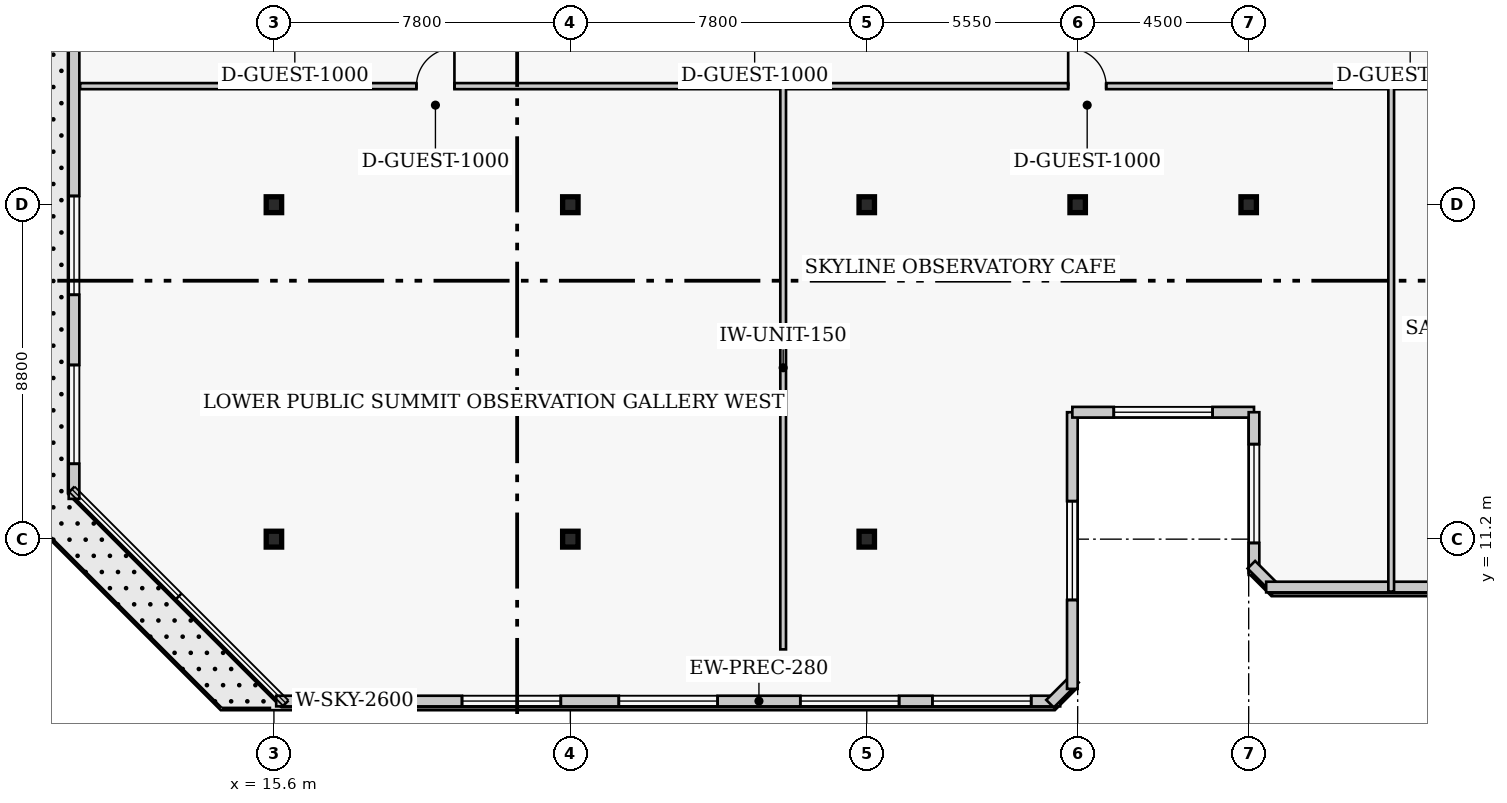
"""IFC4 building model, lengths in metres.
Left out: names, types, materials, properties, quantities, classifications, styles, units other than length and angle.
Written with IfcOpenShell. Run it as: python <this file> out.ifc"""

import sys

from ifc_helpers import new_model, si_unit, direction, frame, frame_2d, origin, origin_2d, place, context, subcontext, project, spatial, rectangle, i_section, extrude, element, fill, save


model = new_model("IFC4")
c1 = context("Model", 3, precision=1e-05, world=origin(), true_north=direction((0.0, 1.0)))
c2 = subcontext(c1, "Body", "Model", "MODEL_VIEW")
j1 = project(units=[si_unit("LENGTHUNIT", "METRE"), si_unit("PLANEANGLEUNIT", "RADIAN")], contexts=[c1])
p1 = place(None, origin())
s1 = spatial("IfcSite", under=j1, at=p1, CompositionType="ELEMENT")
p2 = place(p1, origin())
s2 = spatial("IfcBuilding", under=s1, at=p2, CompositionType="ELEMENT")
p3 = place(p2, frame((0.0, 0.0, 302.0)))
s3 = spatial("IfcBuildingStorey", under=s2, at=p3, CompositionType="ELEMENT", Elevation=302.0)
for number, where, z_axis, x_axis in (
    (1, (15.6, 11.2, 0.0), (0.0, 0.0, 1.0), (1.0, 0.0, 0.0)),
    (2, (15.6, 20.0, 0.0), (0.0, 0.0, 1.0), (1.0, 0.0, 0.0)),
    (3, (23.4, 11.2, 0.0), (0.0, 0.0, 1.0), (1.0, 0.0, 0.0)),
    (4, (23.4, 20.0, 0.0), (0.0, 0.0, 1.0), (1.0, 0.0, 0.0)),
    (5, (31.2, 11.2, 0.0), (0.0, 0.0, 1.0), (1.0, 0.0, 0.0)),
    (6, (31.2, 20.0, 0.0), (0.0, 0.0, 1.0), (1.0, 0.0, 0.0)),
    (7, (36.75, 20.0, 0.0), (0.0, 0.0, 1.0), (1.0, 0.0, 0.0)),
    (8, (41.25, 20.0, 0.0), (0.0, 0.0, 1.0), (1.0, 0.0, 0.0)),
):
    element("IfcColumn", number, at=place(p3, frame(where, z_axis=z_axis, x_axis=x_axis)), inside=s3, PredefinedType="COLUMN", context=c2, shape_type="SweptSolid", body=[
        extrude(i_section(OverallWidth=0.406, OverallDepth=0.417, WebThickness=0.03, FlangeThickness=0.048, FilletRadius=0.017, at=origin_2d()), origin(), (0.0, 0.0, 1.0), 4.6),
    ])
p4 = place(p3, frame((15.66, 6.94, 0.0), z_axis=(0.0, 0.0, 1.0), x_axis=(1.0, 0.0, 0.0)))
e9 = element("IfcWall", 9, at=p4, inside=s3, PredefinedType="SOLIDWALL", context=c2, shape_type="SweptSolid", body=[
    extrude(rectangle(XDim=20.63, YDim=0.28, at=frame_2d((10.315, 0.0))), origin(), (0.0, 0.0, 1.0), 4.31),
])
p5 = place(p4, frame((0.763, 0.0, 0.65)))
e10 = element("IfcOpeningElement", 10, at=p5, cuts=e9, PredefinedType="OPENING", context=c2, shape_type="SweptSolid", body=[
    extrude(rectangle(XDim=2.6, YDim=2.2, at=frame_2d((1.3, 1.1))), frame((0.0, 0.15, 0.0), z_axis=(0.0, -1.0, 0.0), x_axis=(1.0, 0.0, 0.0)), (0.0, 0.0, 1.0), 0.3),
])
p6 = place(p4, frame((4.889, 0.0, 0.65)))
e11 = element("IfcOpeningElement", 11, at=p6, cuts=e9, PredefinedType="OPENING", context=c2, shape_type="SweptSolid", body=[
    extrude(rectangle(XDim=2.6, YDim=2.2, at=frame_2d((1.3, 1.1))), frame((0.0, 0.15, 0.0), z_axis=(0.0, -1.0, 0.0), x_axis=(1.0, 0.0, 0.0)), (0.0, 0.0, 1.0), 0.3),
])
p7 = place(p4, frame((9.015, 0.0, 0.65)))
e12 = element("IfcOpeningElement", 12, at=p7, cuts=e9, PredefinedType="OPENING", context=c2, shape_type="SweptSolid", body=[
    extrude(rectangle(XDim=2.6, YDim=2.2, at=frame_2d((1.3, 1.1))), frame((0.0, 0.15, 0.0), z_axis=(0.0, -1.0, 0.0), x_axis=(1.0, 0.0, 0.0)), (0.0, 0.0, 1.0), 0.3),
])
p8 = place(p4, frame((13.791, 0.0, 0.65)))
e13 = element("IfcOpeningElement", 13, at=p8, cuts=e9, PredefinedType="OPENING", context=c2, shape_type="SweptSolid", body=[
    extrude(rectangle(XDim=2.6, YDim=2.2, at=frame_2d((1.3, 1.1))), frame((0.0, 0.15, 0.0), z_axis=(0.0, -1.0, 0.0), x_axis=(1.0, 0.0, 0.0)), (0.0, 0.0, 1.0), 0.3),
])
p9 = place(p4, frame((17.267, 0.0, 0.65)))
e14 = element("IfcOpeningElement", 14, at=p9, cuts=e9, PredefinedType="OPENING", context=c2, shape_type="SweptSolid", body=[
    extrude(rectangle(XDim=2.6, YDim=2.2, at=frame_2d((1.3, 1.1))), frame((0.0, 0.15, 0.0), z_axis=(0.0, -1.0, 0.0), x_axis=(1.0, 0.0, 0.0)), (0.0, 0.0, 1.0), 0.3),
])
p10 = place(p3, frame((36.023, 6.871, 0.0), z_axis=(0.0, 0.0, 1.0), x_axis=(0.706975312048, 0.707238225886, 0.0)))
e15 = element("IfcWall", 15, at=p10, inside=s3, PredefinedType="SOLIDWALL", context=c2, shape_type="SweptSolid", body=[
    extrude(rectangle(XDim=0.929, YDim=0.28, at=frame_2d((0.464, 0.0))), origin(), (0.0, 0.0, 1.0), 4.31),
])
p11 = place(p3, frame((36.61, 7.26, 0.0), z_axis=(0.0, 0.0, 1.0), x_axis=(0.0, 1.0, 0.0)))
e16 = element("IfcWall", 16, at=p11, inside=s3, PredefinedType="SOLIDWALL", context=c2, shape_type="SweptSolid", body=[
    extrude(rectangle(XDim=7.28, YDim=0.28, at=frame_2d((3.64, 0.0))), origin(), (0.0, 0.0, 1.0), 4.31),
])
p12 = place(p11, frame((2.34, 0.0, 0.65)))
e17 = element("IfcOpeningElement", 17, at=p12, cuts=e16, PredefinedType="OPENING", context=c2, shape_type="SweptSolid", body=[
    extrude(rectangle(XDim=2.6, YDim=2.2, at=frame_2d((1.3, 1.1))), frame((0.0, 0.15, 0.0), z_axis=(0.0, -1.0, 0.0), x_axis=(1.0, 0.0, 0.0)), (0.0, 0.0, 1.0), 0.3),
])
p13 = place(p3, frame((36.61, 14.54, 0.0), z_axis=(0.0, 0.0, 1.0), x_axis=(1.0, 0.0, 0.0)))
e18 = element("IfcWall", 18, at=p13, inside=s3, PredefinedType="SOLIDWALL", context=c2, shape_type="SweptSolid", body=[
    extrude(rectangle(XDim=4.78, YDim=0.28, at=frame_2d((2.39, 0.0))), origin(), (0.0, 0.0, 1.0), 4.31),
])
p14 = place(p13, frame((1.09, 0.0, 0.65)))
e19 = element("IfcOpeningElement", 19, at=p14, cuts=e18, PredefinedType="OPENING", context=c2, shape_type="SweptSolid", body=[
    extrude(rectangle(XDim=2.6, YDim=2.2, at=frame_2d((1.3, 1.1))), frame((0.0, 0.15, 0.0), z_axis=(0.0, -1.0, 0.0), x_axis=(1.0, 0.0, 0.0)), (0.0, 0.0, 1.0), 0.3),
])
p15 = place(p3, frame((41.39, 14.54, 0.0), z_axis=(0.0, 0.0, 1.0), x_axis=(0.0, -1.0, 0.0)))
e20 = element("IfcWall", 20, at=p15, inside=s3, PredefinedType="SOLIDWALL", context=c2, shape_type="SweptSolid", body=[
    extrude(rectangle(XDim=4.28, YDim=0.28, at=frame_2d((2.14, 0.0))), origin(), (0.0, 0.0, 1.0), 4.31),
])
p16 = place(p15, frame((0.84, 0.0, 0.65)))
e21 = element("IfcOpeningElement", 21, at=p16, cuts=e20, PredefinedType="OPENING", context=c2, shape_type="SweptSolid", body=[
    extrude(rectangle(XDim=2.6, YDim=2.2, at=frame_2d((1.3, 1.1))), frame((0.0, 0.15, 0.0), z_axis=(0.0, -1.0, 0.0), x_axis=(1.0, 0.0, 0.0)), (0.0, 0.0, 1.0), 0.3),
])
p17 = place(p3, frame((41.321, 10.527, 0.0), z_axis=(0.0, 0.0, 1.0), x_axis=(0.706975312048, -0.707238225886, 0.0)))
e22 = element("IfcWall", 22, at=p17, inside=s3, PredefinedType="SOLIDWALL", context=c2, shape_type="SweptSolid", body=[
    extrude(rectangle(XDim=0.929, YDim=0.28, at=frame_2d((0.464, 0.0))), origin(), (0.0, 0.0, 1.0), 4.31),
])
p18 = place(p3, frame((41.71, 9.94, 0.0), z_axis=(0.0, 0.0, 1.0), x_axis=(1.0, 0.0, 0.0)))
e23 = element("IfcWall", 23, at=p18, inside=s3, PredefinedType="SOLIDWALL", context=c2, shape_type="SweptSolid", body=[
    extrude(rectangle(XDim=20.63, YDim=0.28, at=frame_2d((10.315, 0.0))), origin(), (0.0, 0.0, 1.0), 4.31),
])
p19 = place(p18, frame((6.039, 0.0, 0.65)))
e24 = element("IfcOpeningElement", 24, at=p19, cuts=e23, PredefinedType="OPENING", context=c2, shape_type="SweptSolid", body=[
    extrude(rectangle(XDim=2.6, YDim=2.2, at=frame_2d((1.3, 1.1))), frame((0.0, 0.15, 0.0), z_axis=(0.0, -1.0, 0.0), x_axis=(1.0, 0.0, 0.0)), (0.0, 0.0, 1.0), 0.3),
])
p20 = place(p18, frame((9.015, 0.0, 0.65)))
e25 = element("IfcOpeningElement", 25, at=p20, cuts=e23, PredefinedType="OPENING", context=c2, shape_type="SweptSolid", body=[
    extrude(rectangle(XDim=2.6, YDim=2.2, at=frame_2d((1.3, 1.1))), frame((0.0, 0.15, 0.0), z_axis=(0.0, -1.0, 0.0), x_axis=(1.0, 0.0, 0.0)), (0.0, 0.0, 1.0), 0.3),
])
p21 = place(p18, frame((13.791, 0.0, 0.65)))
e26 = element("IfcOpeningElement", 26, at=p21, cuts=e23, PredefinedType="OPENING", context=c2, shape_type="SweptSolid", body=[
    extrude(rectangle(XDim=2.6, YDim=2.2, at=frame_2d((1.3, 1.1))), frame((0.0, 0.15, 0.0), z_axis=(0.0, -1.0, 0.0), x_axis=(1.0, 0.0, 0.0)), (0.0, 0.0, 1.0), 0.3),
])
p22 = place(p18, frame((17.267, 0.0, 0.65)))
e27 = element("IfcOpeningElement", 27, at=p22, cuts=e23, PredefinedType="OPENING", context=c2, shape_type="SweptSolid", body=[
    extrude(rectangle(XDim=2.6, YDim=2.2, at=frame_2d((1.3, 1.1))), frame((0.0, 0.15, 0.0), z_axis=(0.0, -1.0, 0.0), x_axis=(1.0, 0.0, 0.0)), (0.0, 0.0, 1.0), 0.3),
])
p23 = place(p3, frame((10.34, 38.94, 0.0), z_axis=(0.0, 0.0, 1.0), x_axis=(0.0, -1.0, 0.0)))
e28 = element("IfcWall", 28, at=p23, inside=s3, PredefinedType="SOLIDWALL", context=c2, shape_type="SweptSolid", body=[
    extrude(rectangle(XDim=26.68, YDim=0.28, at=frame_2d((13.34, 0.0))), origin(), (0.0, 0.0, 1.0), 4.31),
])
p24 = place(p23, frame((0.923, 0.0, 0.65)))
e29 = element("IfcOpeningElement", 29, at=p24, cuts=e28, PredefinedType="OPENING", context=c2, shape_type="SweptSolid", body=[
    extrude(rectangle(XDim=2.6, YDim=2.2, at=frame_2d((1.3, 1.1))), frame((0.0, 0.15, 0.0), z_axis=(0.0, -1.0, 0.0), x_axis=(1.0, 0.0, 0.0)), (0.0, 0.0, 1.0), 0.3),
])
p25 = place(p23, frame((5.37, 0.0, 0.65)))
e30 = element("IfcOpeningElement", 30, at=p25, cuts=e28, PredefinedType="OPENING", context=c2, shape_type="SweptSolid", body=[
    extrude(rectangle(XDim=2.6, YDim=2.2, at=frame_2d((1.3, 1.1))), frame((0.0, 0.15, 0.0), z_axis=(0.0, -1.0, 0.0), x_axis=(1.0, 0.0, 0.0)), (0.0, 0.0, 1.0), 0.3),
])
p26 = place(p23, frame((9.817, 0.0, 0.65)))
e31 = element("IfcOpeningElement", 31, at=p26, cuts=e28, PredefinedType="OPENING", context=c2, shape_type="SweptSolid", body=[
    extrude(rectangle(XDim=2.6, YDim=2.2, at=frame_2d((1.3, 1.1))), frame((0.0, 0.15, 0.0), z_axis=(0.0, -1.0, 0.0), x_axis=(1.0, 0.0, 0.0)), (0.0, 0.0, 1.0), 0.3),
])
p27 = place(p23, frame((18.71, 0.0, 0.65)))
e32 = element("IfcOpeningElement", 32, at=p27, cuts=e28, PredefinedType="OPENING", context=c2, shape_type="SweptSolid", body=[
    extrude(rectangle(XDim=2.6, YDim=2.2, at=frame_2d((1.3, 1.1))), frame((0.0, 0.15, 0.0), z_axis=(0.0, -1.0, 0.0), x_axis=(1.0, 0.0, 0.0)), (0.0, 0.0, 1.0), 0.3),
])
p28 = place(p23, frame((23.157, 0.0, 0.65)))
e33 = element("IfcOpeningElement", 33, at=p28, cuts=e28, PredefinedType="OPENING", context=c2, shape_type="SweptSolid", body=[
    extrude(rectangle(XDim=2.6, YDim=2.2, at=frame_2d((1.3, 1.1))), frame((0.0, 0.15, 0.0), z_axis=(0.0, -1.0, 0.0), x_axis=(1.0, 0.0, 0.0)), (0.0, 0.0, 1.0), 0.3),
])
p29 = place(p3, frame((10.5, 23.12, 0.0), z_axis=(0.0, 0.0, 1.0), x_axis=(1.0, 0.0, 0.0)))
e34 = element("IfcWall", 34, at=p29, inside=s3, PredefinedType="PARTITIONING", context=c2, shape_type="SweptSolid", body=[
    extrude(rectangle(XDim=57.0, YDim=0.16, at=frame_2d((28.5, 0.0))), origin(), (0.0, 0.0, 1.0), 4.31),
])
p30 = place(p29, frame((8.85, 0.0, 0.0)))
e35 = element("IfcOpeningElement", 35, at=p30, cuts=e34, PredefinedType="OPENING", context=c2, shape_type="SweptSolid", body=[
    extrude(rectangle(XDim=1.0, YDim=2.15, at=frame_2d((0.5, 1.075))), frame((0.0, 0.09, 0.0), z_axis=(0.0, -1.0, 0.0), x_axis=(1.0, 0.0, 0.0)), (0.0, 0.0, 1.0), 0.18),
])
p31 = place(p29, frame((26.0, 0.0, 0.0)))
e36 = element("IfcOpeningElement", 36, at=p31, cuts=e34, PredefinedType="OPENING", context=c2, shape_type="SweptSolid", body=[
    extrude(rectangle(XDim=1.0, YDim=2.15, at=frame_2d((0.5, 1.075))), frame((0.0, 0.09, 0.0), z_axis=(0.0, -1.0, 0.0), x_axis=(1.0, 0.0, 0.0)), (0.0, 0.0, 1.0), 0.18),
])
p32 = place(p29, frame((45.15, 0.0, 0.0)))
e37 = element("IfcOpeningElement", 37, at=p32, cuts=e34, PredefinedType="OPENING", context=c2, shape_type="SweptSolid", body=[
    extrude(rectangle(XDim=1.0, YDim=2.15, at=frame_2d((0.5, 1.075))), frame((0.0, 0.09, 0.0), z_axis=(0.0, -1.0, 0.0), x_axis=(1.0, 0.0, 0.0)), (0.0, 0.0, 1.0), 0.18),
])
p33 = place(p3, frame((29.0, 8.3, 0.0), z_axis=(0.0, 0.0, 1.0), x_axis=(0.0, 1.0, 0.0)))
e38 = element("IfcWall", 38, at=p33, inside=s3, PredefinedType="PARTITIONING", context=c2, shape_type="SweptSolid", body=[
    extrude(rectangle(XDim=14.82, YDim=0.15, at=frame_2d((7.41, 0.0))), origin(), (0.0, 0.0, 1.0), 4.31),
])
p34 = place(p3, frame((45.0, 9.82, 0.0), z_axis=(0.0, 0.0, 1.0), x_axis=(0.0, 1.0, 0.0)))
e39 = element("IfcWall", 39, at=p34, inside=s3, PredefinedType="PARTITIONING", context=c2, shape_type="SweptSolid", body=[
    extrude(rectangle(XDim=13.3, YDim=0.15, at=frame_2d((6.65, 0.0))), origin(), (0.0, 0.0, 1.0), 4.31),
])
p35 = place(p5, origin())
e40 = element("IfcWindow", 40, at=p35, inside=s3, PartitioningType="SINGLE_PANEL", PredefinedType="WINDOW", context=c2, shape_type="SweptSolid", body=[
    extrude(rectangle(XDim=2.6, YDim=2.2, at=frame_2d((1.3, 1.1))), frame((0.0, 0.03, 0.0), z_axis=(0.0, -1.0, 0.0), x_axis=(1.0, 0.0, 0.0)), (0.0, 0.0, 1.0), 0.06),
])
fill(e10, e40)
p36 = place(p6, origin())
e41 = element("IfcWindow", 41, at=p36, inside=s3, PartitioningType="SINGLE_PANEL", PredefinedType="WINDOW", context=c2, shape_type="SweptSolid", body=[
    extrude(rectangle(XDim=2.6, YDim=2.2, at=frame_2d((1.3, 1.1))), frame((0.0, 0.03, 0.0), z_axis=(0.0, -1.0, 0.0), x_axis=(1.0, 0.0, 0.0)), (0.0, 0.0, 1.0), 0.06),
])
fill(e11, e41)
p37 = place(p7, origin())
e42 = element("IfcWindow", 42, at=p37, inside=s3, PartitioningType="SINGLE_PANEL", PredefinedType="WINDOW", context=c2, shape_type="SweptSolid", body=[
    extrude(rectangle(XDim=2.6, YDim=2.2, at=frame_2d((1.3, 1.1))), frame((0.0, 0.03, 0.0), z_axis=(0.0, -1.0, 0.0), x_axis=(1.0, 0.0, 0.0)), (0.0, 0.0, 1.0), 0.06),
])
fill(e12, e42)
p38 = place(p8, origin())
e43 = element("IfcWindow", 43, at=p38, inside=s3, PartitioningType="SINGLE_PANEL", PredefinedType="WINDOW", context=c2, shape_type="SweptSolid", body=[
    extrude(rectangle(XDim=2.6, YDim=2.2, at=frame_2d((1.3, 1.1))), frame((0.0, 0.03, 0.0), z_axis=(0.0, -1.0, 0.0), x_axis=(1.0, 0.0, 0.0)), (0.0, 0.0, 1.0), 0.06),
])
fill(e13, e43)
p39 = place(p9, origin())
e44 = element("IfcWindow", 44, at=p39, inside=s3, PartitioningType="SINGLE_PANEL", PredefinedType="WINDOW", context=c2, shape_type="SweptSolid", body=[
    extrude(rectangle(XDim=2.6, YDim=2.2, at=frame_2d((1.3, 1.1))), frame((0.0, 0.03, 0.0), z_axis=(0.0, -1.0, 0.0), x_axis=(1.0, 0.0, 0.0)), (0.0, 0.0, 1.0), 0.06),
])
fill(e14, e44)
p40 = place(p12, origin())
e45 = element("IfcWindow", 45, at=p40, inside=s3, PartitioningType="SINGLE_PANEL", PredefinedType="WINDOW", context=c2, shape_type="SweptSolid", body=[
    extrude(rectangle(XDim=2.6, YDim=2.2, at=frame_2d((1.3, 1.1))), frame((0.0, 0.03, 0.0), z_axis=(0.0, -1.0, 0.0), x_axis=(1.0, 0.0, 0.0)), (0.0, 0.0, 1.0), 0.06),
])
fill(e17, e45)
p41 = place(p14, origin())
e46 = element("IfcWindow", 46, at=p41, inside=s3, PartitioningType="SINGLE_PANEL", PredefinedType="WINDOW", context=c2, shape_type="SweptSolid", body=[
    extrude(rectangle(XDim=2.6, YDim=2.2, at=frame_2d((1.3, 1.1))), frame((0.0, 0.03, 0.0), z_axis=(0.0, -1.0, 0.0), x_axis=(1.0, 0.0, 0.0)), (0.0, 0.0, 1.0), 0.06),
])
fill(e19, e46)
p42 = place(p16, origin())
e47 = element("IfcWindow", 47, at=p42, inside=s3, PartitioningType="SINGLE_PANEL", PredefinedType="WINDOW", context=c2, shape_type="SweptSolid", body=[
    extrude(rectangle(XDim=2.6, YDim=2.2, at=frame_2d((1.3, 1.1))), frame((0.0, 0.03, 0.0), z_axis=(0.0, -1.0, 0.0), x_axis=(1.0, 0.0, 0.0)), (0.0, 0.0, 1.0), 0.06),
])
fill(e21, e47)
p43 = place(p27, origin())
e48 = element("IfcWindow", 48, at=p43, inside=s3, PartitioningType="SINGLE_PANEL", PredefinedType="WINDOW", context=c2, shape_type="SweptSolid", body=[
    extrude(rectangle(XDim=2.6, YDim=2.2, at=frame_2d((1.3, 1.1))), frame((0.0, 0.03, 0.0), z_axis=(0.0, -1.0, 0.0), x_axis=(1.0, 0.0, 0.0)), (0.0, 0.0, 1.0), 0.06),
])
fill(e32, e48)
p44 = place(p28, origin())
e49 = element("IfcWindow", 49, at=p44, inside=s3, PartitioningType="SINGLE_PANEL", PredefinedType="WINDOW", context=c2, shape_type="SweptSolid", body=[
    extrude(rectangle(XDim=2.6, YDim=2.2, at=frame_2d((1.3, 1.1))), frame((0.0, 0.03, 0.0), z_axis=(0.0, -1.0, 0.0), x_axis=(1.0, 0.0, 0.0)), (0.0, 0.0, 1.0), 0.06),
])
fill(e33, e49)
p45 = place(p30, origin())
e50 = element("IfcDoor", 50, at=p45, inside=s3, OperationType="SINGLE_SWING_RIGHT", PredefinedType="DOOR", context=c2, shape_type="SweptSolid", body=[
    extrude(rectangle(XDim=1.0, YDim=2.15, at=frame_2d((0.5, 1.075))), frame((0.0, 0.025, 0.0), z_axis=(0.0, -1.0, 0.0), x_axis=(1.0, 0.0, 0.0)), (0.0, 0.0, 1.0), 0.05),
])
fill(e35, e50)
p46 = place(p31, origin())
e51 = element("IfcDoor", 51, at=p46, inside=s3, OperationType="SINGLE_SWING_LEFT", PredefinedType="DOOR", context=c2, shape_type="SweptSolid", body=[
    extrude(rectangle(XDim=1.0, YDim=2.15, at=frame_2d((0.5, 1.075))), frame((0.0, 0.025, 0.0), z_axis=(0.0, -1.0, 0.0), x_axis=(1.0, 0.0, 0.0)), (0.0, 0.0, 1.0), 0.05),
])
fill(e36, e51)
save(model, sys.argv[1])
